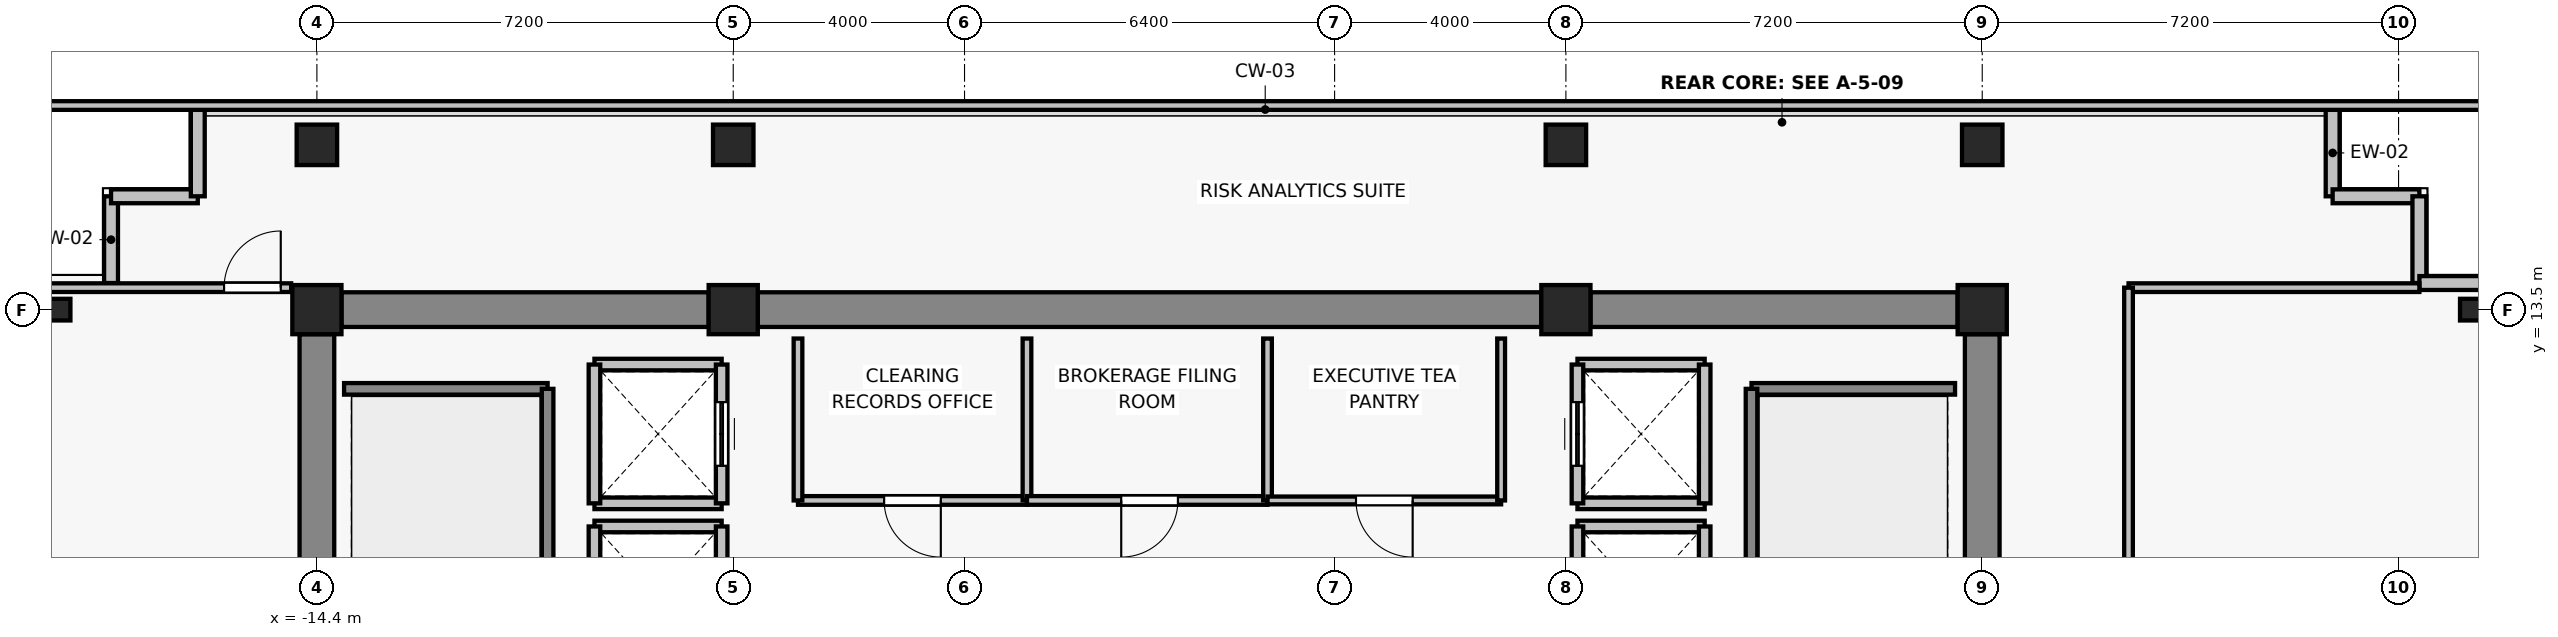
"""IFC4 building model, lengths in metres.
Left out: names, types, materials, properties, quantities, classifications, styles, units other than length and angle.
Written with IfcOpenShell. Run it as: python <this file> out.ifc"""

import sys

from ifc_helpers import new_model, si_unit, direction, frame, frame_2d, origin, origin_2d, place, context, subcontext, project, spatial, rectangle, i_section, extrude, source, transform, mapped, element, fill, save


model = new_model("IFC4")
c1 = context("Model", 3, precision=1e-05, world=origin(), true_north=direction((0.0, 1.0)))
c2 = subcontext(c1, "Body", "Model", "MODEL_VIEW")
j1 = project(units=[si_unit("LENGTHUNIT", "METRE"), si_unit("PLANEANGLEUNIT", "RADIAN")], contexts=[c1])
p1 = place(None, origin())
s1 = spatial("IfcSite", under=j1, at=p1, CompositionType="ELEMENT")
p2 = place(p1, origin())
s2 = spatial("IfcBuilding", under=s1, at=p2, CompositionType="ELEMENT")
p3 = place(p2, frame((0.0, 0.0, 245.2)))
s3 = spatial("IfcBuildingStorey", under=s2, at=p3, CompositionType="ELEMENT", Elevation=245.2)
for number, where, z_axis, x_axis in (
    (1, (-14.4, 13.5, 0.0), (0.0, 0.0, 1.0), (1.0, 0.0, 0.0)),
    (2, (-7.2, 13.5, 0.0), (0.0, 0.0, 1.0), (1.0, 0.0, 0.0)),
    (3, (7.2, 13.5, 0.0), (0.0, 0.0, 1.0), (1.0, 0.0, 0.0)),
    (4, (14.4, 13.5, 0.0), (0.0, 0.0, 1.0), (1.0, 0.0, 0.0)),
):
    element("IfcColumn", number, at=place(p3, frame(where, z_axis=z_axis, x_axis=x_axis)), inside=s3, PredefinedType="COLUMN", context=c2, shape_type="SweptSolid", body=[
        extrude(rectangle(XDim=0.85, YDim=0.85, at=origin_2d()), origin(), (0.0, 0.0, 1.0), 3.3),
    ])
for number, where, z_axis, x_axis in (
    (5, (-14.4, 16.35, 0.0), (0.0, 0.0, 1.0), (1.0, 0.0, 0.0)),
    (6, (-7.2, 16.35, 0.0), (0.0, 0.0, 1.0), (1.0, 0.0, 0.0)),
    (7, (7.2, 16.35, 0.0), (0.0, 0.0, 1.0), (1.0, 0.0, 0.0)),
    (8, (14.4, 16.35, 0.0), (0.0, 0.0, 1.0), (1.0, 0.0, 0.0)),
):
    element("IfcColumn", number, at=place(p3, frame(where, z_axis=z_axis, x_axis=x_axis)), inside=s3, PredefinedType="COLUMN", context=c2, shape_type="SweptSolid", body=[
        extrude(rectangle(XDim=0.7, YDim=0.7, at=origin_2d()), origin(), (0.0, 0.0, 1.0), 3.3),
    ])
for number, where, z_axis, x_axis in (
    (9, (-18.85, 13.5, 0.0), (0.0, 0.0, 1.0), (1.0, 0.0, 0.0)),
    (10, (22.85, 13.5, 0.0), (0.0, 0.0, 1.0), (1.0, 0.0, 0.0)),
):
    element("IfcColumn", number, at=place(p3, frame(where, z_axis=z_axis, x_axis=x_axis)), inside=s3, PredefinedType="COLUMN", context=c2, shape_type="SweptSolid", body=[
        extrude(i_section(OverallWidth=0.375, OverallDepth=0.375, WebThickness=0.017, FlangeThickness=0.027, FilletRadius=0.015, at=origin_2d()), origin(), (0.0, 0.0, 1.0), 3.3),
    ])
p4 = place(p3, frame((-13.975, 13.5, 0.0), z_axis=(0.0, 0.0, 1.0), x_axis=(1.0, 0.0, 0.0)))
e11 = element("IfcWall", 11, at=p4, inside=s3, PredefinedType="SHEAR", context=c2, shape_type="SweptSolid", body=[
    extrude(rectangle(XDim=6.35, YDim=0.6, at=frame_2d((3.175, 0.0))), origin(), (0.0, 0.0, 1.0), 3.075),
])
p5 = place(p3, frame((-6.775, 13.5, 0.0), z_axis=(0.0, 0.0, 1.0), x_axis=(1.0, 0.0, 0.0)))
e12 = element("IfcWall", 12, at=p5, inside=s3, PredefinedType="SHEAR", context=c2, shape_type="SweptSolid", body=[
    extrude(rectangle(XDim=13.55, YDim=0.6, at=frame_2d((6.775, 0.0))), origin(), (0.0, 0.0, 1.0), 3.075),
])
p6 = place(p3, frame((7.625, 13.5, 0.0), z_axis=(0.0, 0.0, 1.0), x_axis=(1.0, 0.0, 0.0)))
e13 = element("IfcWall", 13, at=p6, inside=s3, PredefinedType="SHEAR", context=c2, shape_type="SweptSolid", body=[
    extrude(rectangle(XDim=6.35, YDim=0.6, at=frame_2d((3.175, 0.0))), origin(), (0.0, 0.0, 1.0), 3.075),
])
for number, where, z_axis, x_axis in (
    (14, (-14.4, 7.025, 0.0), (0.0, 0.0, 1.0), (0.0, 1.0, 0.0)),
    (15, (14.4, 7.025, 0.0), (0.0, 0.0, 1.0), (0.0, 1.0, 0.0)),
):
    element("IfcWall", number, at=place(p3, frame(where, z_axis=z_axis, x_axis=x_axis)), inside=s3, PredefinedType="SHEAR", context=c2, shape_type="SweptSolid", body=[
        extrude(rectangle(XDim=6.05, YDim=0.6, at=frame_2d((3.025, 0.0))), origin(), (0.0, 0.0, 1.0), 3.075),
    ])
for number, where, z_axis, x_axis in (
    (16, (-17.96, 15.46, 0.0), (0.0, 0.0, 1.0), (0.0, -1.0, 0.0)),
    (17, (-16.46, 15.46, 0.0), (0.0, 0.0, 1.0), (-1.0, 0.0, 0.0)),
    (18, (-16.46, 16.96, 0.0), (0.0, 0.0, 1.0), (0.0, -1.0, 0.0)),
    (19, (20.46, 15.46, 0.0), (0.0, 0.0, 1.0), (0.0, 1.0, 0.0)),
    (20, (21.96, 15.46, 0.0), (0.0, 0.0, 1.0), (-1.0, 0.0, 0.0)),
    (21, (21.96, 13.96, 0.0), (0.0, 0.0, 1.0), (0.0, 1.0, 0.0)),
    (22, (23.46, 13.96, 0.0), (0.0, 0.0, 1.0), (-1.0, 0.0, 0.0)),
):
    element("IfcWall", number, at=place(p3, frame(where, z_axis=z_axis, x_axis=x_axis)), inside=s3, PredefinedType="SOLIDWALL", context=c2, shape_type="SweptSolid", body=[
        extrude(rectangle(XDim=1.5, YDim=0.24, at=frame_2d((0.75, 0.0))), origin(), (0.0, 0.0, 1.0), 3.075),
    ])
p7 = place(p3, frame((-9.6, 9.75, 0.0), z_axis=(0.0, 0.0, 1.0), x_axis=(1.0, 0.0, 0.0)))
e23 = element("IfcWall", 23, at=p7, inside=s3, PredefinedType="SOLIDWALL", context=c2, shape_type="SweptSolid", body=[
    extrude(rectangle(XDim=2.2, YDim=0.2, at=frame_2d((1.1, 0.0))), origin(), (0.0, 0.0, 1.0), 2.615),
])
p8 = place(p3, frame((-9.6, 7.35, 0.0), z_axis=(0.0, 0.0, 1.0), x_axis=(0.0, 1.0, 0.0)))
e24 = element("IfcWall", 24, at=p8, inside=s3, PredefinedType="SOLIDWALL", context=c2, shape_type="SweptSolid", body=[
    extrude(rectangle(XDim=2.4, YDim=0.2, at=frame_2d((1.2, 0.0))), origin(), (0.0, 0.0, 1.0), 3.075),
])
p9 = place(p3, frame((-7.4, 9.75, 0.0), z_axis=(0.0, 0.0, 1.0), x_axis=(0.0, -1.0, 0.0)))
e25 = element("IfcWall", 25, at=p9, inside=s3, PredefinedType="SOLIDWALL", context=c2, shape_type="SweptSolid", body=[
    extrude(rectangle(XDim=2.4, YDim=0.2, at=frame_2d((1.2, 0.0))), origin(), (0.0, 0.0, 1.0), 2.615),
])
p10 = place(p9, frame((0.65, 0.0, 0.0)))
e26 = element("IfcOpeningElement", 26, at=p10, cuts=e25, PredefinedType="OPENING", context=c2, shape_type="SweptSolid", body=[
    extrude(rectangle(XDim=1.1, YDim=2.2, at=frame_2d((0.55, 1.1))), frame((0.0, 0.11, 0.0), z_axis=(0.0, -1.0, 0.0), x_axis=(1.0, 0.0, 0.0)), (0.0, 0.0, 1.0), 0.22),
])
for number, where, z_axis, x_axis in (
    (27, (-7.4, 10.15, 0.0), (0.0, 0.0, 1.0), (-1.0, 0.0, 0.0)),
    (28, (-9.6, 12.55, 0.0), (0.0, 0.0, 1.0), (1.0, 0.0, 0.0)),
):
    element("IfcWall", number, at=place(p3, frame(where, z_axis=z_axis, x_axis=x_axis)), inside=s3, PredefinedType="SOLIDWALL", context=c2, shape_type="SweptSolid", body=[
        extrude(rectangle(XDim=2.2, YDim=0.2, at=frame_2d((1.1, 0.0))), origin(), (0.0, 0.0, 1.0), 2.615),
    ])
p11 = place(p3, frame((-9.6, 10.15, 0.0), z_axis=(0.0, 0.0, 1.0), x_axis=(0.0, 1.0, 0.0)))
e29 = element("IfcWall", 29, at=p11, inside=s3, PredefinedType="SOLIDWALL", context=c2, shape_type="SweptSolid", body=[
    extrude(rectangle(XDim=2.4, YDim=0.2, at=frame_2d((1.2, 0.0))), origin(), (0.0, 0.0, 1.0), 3.075),
])
p12 = place(p3, frame((-7.4, 12.55, 0.0), z_axis=(0.0, 0.0, 1.0), x_axis=(0.0, -1.0, 0.0)))
e30 = element("IfcWall", 30, at=p12, inside=s3, PredefinedType="SOLIDWALL", context=c2, shape_type="SweptSolid", body=[
    extrude(rectangle(XDim=2.4, YDim=0.2, at=frame_2d((1.2, 0.0))), origin(), (0.0, 0.0, 1.0), 2.615),
])
p13 = place(p12, frame((0.65, 0.0, 0.0)))
e31 = element("IfcOpeningElement", 31, at=p13, cuts=e30, PredefinedType="OPENING", context=c2, shape_type="SweptSolid", body=[
    extrude(rectangle(XDim=1.1, YDim=2.2, at=frame_2d((0.55, 1.1))), frame((0.0, 0.11, 0.0), z_axis=(0.0, -1.0, 0.0), x_axis=(1.0, 0.0, 0.0)), (0.0, 0.0, 1.0), 0.22),
])
p14 = place(p3, frame((7.4, 9.75, 0.0), z_axis=(0.0, 0.0, 1.0), x_axis=(1.0, 0.0, 0.0)))
e32 = element("IfcWall", 32, at=p14, inside=s3, PredefinedType="SOLIDWALL", context=c2, shape_type="SweptSolid", body=[
    extrude(rectangle(XDim=2.2, YDim=0.2, at=frame_2d((1.1, 0.0))), origin(), (0.0, 0.0, 1.0), 2.615),
])
p15 = place(p3, frame((7.4, 7.35, 0.0), z_axis=(0.0, 0.0, 1.0), x_axis=(0.0, 1.0, 0.0)))
e33 = element("IfcWall", 33, at=p15, inside=s3, PredefinedType="SOLIDWALL", context=c2, shape_type="SweptSolid", body=[
    extrude(rectangle(XDim=2.4, YDim=0.2, at=frame_2d((1.2, 0.0))), origin(), (0.0, 0.0, 1.0), 2.615),
])
p16 = place(p15, frame((0.65, 0.0, 0.0)))
e34 = element("IfcOpeningElement", 34, at=p16, cuts=e33, PredefinedType="OPENING", context=c2, shape_type="SweptSolid", body=[
    extrude(rectangle(XDim=1.1, YDim=2.2, at=frame_2d((0.55, 1.1))), frame((0.0, 0.11, 0.0), z_axis=(0.0, -1.0, 0.0), x_axis=(1.0, 0.0, 0.0)), (0.0, 0.0, 1.0), 0.22),
])
p17 = place(p3, frame((9.6, 9.75, 0.0), z_axis=(0.0, 0.0, 1.0), x_axis=(0.0, -1.0, 0.0)))
e35 = element("IfcWall", 35, at=p17, inside=s3, PredefinedType="SOLIDWALL", context=c2, shape_type="SweptSolid", body=[
    extrude(rectangle(XDim=2.4, YDim=0.2, at=frame_2d((1.2, 0.0))), origin(), (0.0, 0.0, 1.0), 3.075),
])
for number, where, z_axis, x_axis in (
    (36, (9.6, 10.15, 0.0), (0.0, 0.0, 1.0), (-1.0, 0.0, 0.0)),
    (37, (7.4, 12.55, 0.0), (0.0, 0.0, 1.0), (1.0, 0.0, 0.0)),
):
    element("IfcWall", number, at=place(p3, frame(where, z_axis=z_axis, x_axis=x_axis)), inside=s3, PredefinedType="SOLIDWALL", context=c2, shape_type="SweptSolid", body=[
        extrude(rectangle(XDim=2.2, YDim=0.2, at=frame_2d((1.1, 0.0))), origin(), (0.0, 0.0, 1.0), 2.615),
    ])
p18 = place(p3, frame((7.4, 10.15, 0.0), z_axis=(0.0, 0.0, 1.0), x_axis=(0.0, 1.0, 0.0)))
e38 = element("IfcWall", 38, at=p18, inside=s3, PredefinedType="SOLIDWALL", context=c2, shape_type="SweptSolid", body=[
    extrude(rectangle(XDim=2.4, YDim=0.2, at=frame_2d((1.2, 0.0))), origin(), (0.0, 0.0, 1.0), 2.615),
])
p19 = place(p18, frame((0.65, 0.0, 0.0)))
e39 = element("IfcOpeningElement", 39, at=p19, cuts=e38, PredefinedType="OPENING", context=c2, shape_type="SweptSolid", body=[
    extrude(rectangle(XDim=1.1, YDim=2.2, at=frame_2d((0.55, 1.1))), frame((0.0, 0.11, 0.0), z_axis=(0.0, -1.0, 0.0), x_axis=(1.0, 0.0, 0.0)), (0.0, 0.0, 1.0), 0.22),
])
p20 = place(p3, frame((9.6, 12.55, 0.0), z_axis=(0.0, 0.0, 1.0), x_axis=(0.0, -1.0, 0.0)))
e40 = element("IfcWall", 40, at=p20, inside=s3, PredefinedType="SOLIDWALL", context=c2, shape_type="SweptSolid", body=[
    extrude(rectangle(XDim=2.4, YDim=0.2, at=frame_2d((1.2, 0.0))), origin(), (0.0, 0.0, 1.0), 3.075),
])
p21 = place(p3, frame((-13.93, 12.13, 0.0), z_axis=(0.0, 0.0, 1.0), x_axis=(1.0, 0.0, 0.0)))
e41 = element("IfcWall", 41, at=p21, inside=s3, PredefinedType="SOLIDWALL", context=c2, shape_type="SweptSolid", body=[
    extrude(rectangle(XDim=3.52, YDim=0.2, at=frame_2d((1.76, 0.0))), origin(), (0.0, 0.0, 1.0), 3.075),
])
p22 = place(p3, frame((-10.41, 12.13, 0.0), z_axis=(0.0, 0.0, 1.0), x_axis=(0.0, -1.0, 0.0)))
e42 = element("IfcWall", 42, at=p22, inside=s3, PredefinedType="SOLIDWALL", context=c2, shape_type="SweptSolid", body=[
    extrude(rectangle(XDim=8.84, YDim=0.2, at=frame_2d((4.42, 0.0))), origin(), (0.0, 0.0, 1.0), 3.075),
])
p23 = place(p3, frame((10.41, 12.13, 0.0), z_axis=(0.0, 0.0, 1.0), x_axis=(1.0, 0.0, 0.0)))
e43 = element("IfcWall", 43, at=p23, inside=s3, PredefinedType="SOLIDWALL", context=c2, shape_type="SweptSolid", body=[
    extrude(rectangle(XDim=3.52, YDim=0.2, at=frame_2d((1.76, 0.0))), origin(), (0.0, 0.0, 1.0), 3.075),
])
p24 = place(p3, frame((10.41, 3.29, 0.0), z_axis=(0.0, 0.0, 1.0), x_axis=(0.0, 1.0, 0.0)))
e44 = element("IfcWall", 44, at=p24, inside=s3, PredefinedType="SOLIDWALL", context=c2, shape_type="SweptSolid", body=[
    extrude(rectangle(XDim=8.84, YDim=0.2, at=frame_2d((4.42, 0.0))), origin(), (0.0, 0.0, 1.0), 3.075),
])
p25 = place(p3, frame((-2.12, 10.2, 0.0), z_axis=(0.0, 0.0, 1.0), x_axis=(-1.0, 0.0, 0.0)))
e45 = element("IfcWall", 45, at=p25, inside=s3, PredefinedType="PARTITIONING", context=c2, shape_type="SweptSolid", body=[
    extrude(rectangle(XDim=3.96, YDim=0.15, at=frame_2d((1.98, 0.0))), origin(), (0.0, 0.0, 1.0), 3.075),
])
p26 = place(p25, frame((1.49, 0.0, 0.0)))
e46 = element("IfcOpeningElement", 46, at=p26, cuts=e45, PredefinedType="OPENING", context=c2, shape_type="SweptSolid", body=[
    extrude(rectangle(XDim=0.98, YDim=2.15, at=frame_2d((0.49, 1.075))), frame((0.0, 0.085, 0.0), z_axis=(0.0, -1.0, 0.0), x_axis=(1.0, 0.0, 0.0)), (0.0, 0.0, 1.0), 0.17),
])
for number, where, z_axis, x_axis in (
    (47, (-6.08, 10.2, 0.0), (0.0, 0.0, 1.0), (0.0, 1.0, 0.0)),
    (48, (-2.12, 13.0, 0.0), (0.0, 0.0, 1.0), (0.0, -1.0, 0.0)),
):
    element("IfcWall", number, at=place(p3, frame(where, z_axis=z_axis, x_axis=x_axis)), inside=s3, PredefinedType="PARTITIONING", context=c2, shape_type="SweptSolid", body=[
        extrude(rectangle(XDim=2.8, YDim=0.15, at=frame_2d((1.4, 0.0))), origin(), (0.0, 0.0, 1.0), 3.075),
    ])
p27 = place(p3, frame((2.04, 10.2, 0.0), z_axis=(0.0, 0.0, 1.0), x_axis=(-1.0, 0.0, 0.0)))
e49 = element("IfcWall", 49, at=p27, inside=s3, PredefinedType="PARTITIONING", context=c2, shape_type="SweptSolid", body=[
    extrude(rectangle(XDim=4.16, YDim=0.15, at=frame_2d((2.08, 0.0))), origin(), (0.0, 0.0, 1.0), 3.075),
])
p28 = place(p27, frame((1.55, 0.0, 0.0)))
e50 = element("IfcOpeningElement", 50, at=p28, cuts=e49, PredefinedType="OPENING", context=c2, shape_type="SweptSolid", body=[
    extrude(rectangle(XDim=0.98, YDim=2.15, at=frame_2d((0.49, 1.075))), frame((0.0, 0.085, 0.0), z_axis=(0.0, -1.0, 0.0), x_axis=(1.0, 0.0, 0.0)), (0.0, 0.0, 1.0), 0.17),
])
p29 = place(p3, frame((2.04, 13.0, 0.0), z_axis=(0.0, 0.0, 1.0), x_axis=(0.0, -1.0, 0.0)))
e51 = element("IfcWall", 51, at=p29, inside=s3, PredefinedType="PARTITIONING", context=c2, shape_type="SweptSolid", body=[
    extrude(rectangle(XDim=2.8, YDim=0.15, at=frame_2d((1.4, 0.0))), origin(), (0.0, 0.0, 1.0), 3.075),
])
p30 = place(p3, frame((6.08, 10.2, 0.0), z_axis=(0.0, 0.0, 1.0), x_axis=(-1.0, 0.0, 0.0)))
e52 = element("IfcWall", 52, at=p30, inside=s3, PredefinedType="PARTITIONING", context=c2, shape_type="SweptSolid", body=[
    extrude(rectangle(XDim=4.04, YDim=0.135, at=frame_2d((2.02, 0.0))), origin(), (0.0, 0.0, 1.0), 3.075),
])
p31 = place(p30, frame((1.53, 0.0, 0.0)))
e53 = element("IfcOpeningElement", 53, at=p31, cuts=e52, PredefinedType="OPENING", context=c2, shape_type="SweptSolid", body=[
    extrude(rectangle(XDim=0.98, YDim=2.15, at=frame_2d((0.49, 1.075))), frame((0.0, 0.077, 0.0), z_axis=(0.0, -1.0, 0.0), x_axis=(1.0, 0.0, 0.0)), (0.0, 0.0, 1.0), 0.155),
])
p32 = place(p3, frame((6.08, 13.0, 0.0), z_axis=(0.0, 0.0, 1.0), x_axis=(0.0, -1.0, 0.0)))
e54 = element("IfcWall", 54, at=p32, inside=s3, PredefinedType="PARTITIONING", context=c2, shape_type="SweptSolid", body=[
    extrude(rectangle(XDim=2.8, YDim=0.135, at=frame_2d((1.4, 0.0))), origin(), (0.0, 0.0, 1.0), 3.075),
])
p33 = place(p3, frame((-19.53, 13.88, 0.0), z_axis=(0.0, 0.0, 1.0), x_axis=(1.0, 0.0, 0.0)))
e55 = element("IfcWall", 55, at=p33, inside=s3, PredefinedType="PARTITIONING", context=c2, shape_type="SweptSolid", body=[
    extrude(rectangle(XDim=4.685, YDim=0.15, at=frame_2d((2.343, 0.0))), origin(), (0.0, 0.0, 1.0), 3.075),
])
p34 = place(p33, frame((3.525, 0.0, 0.0)))
e56 = element("IfcOpeningElement", 56, at=p34, cuts=e55, PredefinedType="OPENING", context=c2, shape_type="SweptSolid", body=[
    extrude(rectangle(XDim=0.98, YDim=2.15, at=frame_2d((0.49, 1.075))), frame((0.0, 0.085, 0.0), z_axis=(0.0, -1.0, 0.0), x_axis=(1.0, 0.0, 0.0)), (0.0, 0.0, 1.0), 0.17),
])
p35 = place(p3, frame((16.93, 13.88, 0.0), z_axis=(0.0, 0.0, 1.0), x_axis=(1.0, 0.0, 0.0)))
e57 = element("IfcWall", 57, at=p35, inside=s3, PredefinedType="PARTITIONING", context=c2, shape_type="SweptSolid", body=[
    extrude(rectangle(XDim=5.03, YDim=0.15, at=frame_2d((2.515, 0.0))), origin(), (0.0, 0.0, 1.0), 3.075),
])
p36 = place(p3, frame((16.93, -1.77, 0.0), z_axis=(0.0, 0.0, 1.0), x_axis=(0.0, 1.0, 0.0)))
e58 = element("IfcWall", 58, at=p36, inside=s3, PredefinedType="PARTITIONING", context=c2, shape_type="SweptSolid", body=[
    extrude(rectangle(XDim=15.65, YDim=0.15, at=frame_2d((7.825, 0.0))), origin(), (0.0, 0.0, 1.0), 2.615),
])
p37 = place(p36, frame((7.335, 0.0, 0.0)))
e59 = element("IfcOpeningElement", 59, at=p37, cuts=e58, PredefinedType="OPENING", context=c2, shape_type="SweptSolid", body=[
    extrude(rectangle(XDim=0.98, YDim=2.15, at=frame_2d((0.49, 1.075))), frame((0.0, 0.085, 0.0), z_axis=(0.0, -1.0, 0.0), x_axis=(1.0, 0.0, 0.0)), (0.0, 0.0, 1.0), 0.17),
])
p38 = place(p3, frame((-19.53, 17.03, 0.0), z_axis=(0.0, 0.0, 1.0), x_axis=(1.0, 0.0, 0.0)))
e60 = element("IfcWall", 60, at=p38, inside=s3, PredefinedType="PARTITIONING", context=c2, shape_type="SweptSolid", body=[
    extrude(rectangle(XDim=43.06, YDim=0.15, at=frame_2d((21.53, 0.0))), origin(), (0.0, 0.0, 1.0), 3.075),
])
m1 = source(origin(), c2, "Body", "SweptSolid", [
    extrude(rectangle(XDim=1.1, YDim=2.2, at=frame_2d((0.55, 1.1))), frame((0.0, 0.025, 0.0), z_axis=(0.0, -1.0, 0.0), x_axis=(1.0, 0.0, 0.0)), (0.0, 0.0, 1.0), 0.05),
])
p39 = place(p13, origin())
e61 = element("IfcDoor", 61, at=p39, inside=s3, OperationType="DOUBLE_DOOR_SLIDING", PredefinedType="DOOR", context=c2, shape_type="MappedRepresentation", body=[
    mapped(m1, transform((0.0, 0.0, 0.0), x_axis=(1.0, 0.0, 0.0), y_axis=(0.0, 1.0, 0.0), z_axis=(0.0, 0.0, 1.0), scale=1.0)),
])
fill(e31, e61)
p40 = place(p19, origin())
e62 = element("IfcDoor", 62, at=p40, inside=s3, OperationType="DOUBLE_DOOR_SLIDING", PredefinedType="DOOR", context=c2, shape_type="MappedRepresentation", body=[
    mapped(m1, transform((0.0, 0.0, 0.0), x_axis=(1.0, 0.0, 0.0), y_axis=(0.0, 1.0, 0.0), z_axis=(0.0, 0.0, 1.0), scale=1.0)),
])
fill(e39, e62)
m2 = source(origin(), c2, "Body", "SweptSolid", [
    extrude(rectangle(XDim=0.98, YDim=2.15, at=frame_2d((0.49, 1.075))), frame((0.0, 0.025, 0.0), z_axis=(0.0, -1.0, 0.0), x_axis=(1.0, 0.0, 0.0)), (0.0, 0.0, 1.0), 0.05),
])
p41 = place(p26, origin())
e63 = element("IfcDoor", 63, at=p41, inside=s3, OperationType="SINGLE_SWING_LEFT", PredefinedType="DOOR", context=c2, shape_type="MappedRepresentation", body=[
    mapped(m2, transform((0.0, 0.0, 0.0), x_axis=(1.0, 0.0, 0.0), y_axis=(0.0, 1.0, 0.0), z_axis=(0.0, 0.0, 1.0), scale=1.0)),
])
fill(e46, e63)
p42 = place(p28, origin())
e64 = element("IfcDoor", 64, at=p42, inside=s3, OperationType="SINGLE_SWING_RIGHT", PredefinedType="DOOR", context=c2, shape_type="MappedRepresentation", body=[
    mapped(m2, transform((0.0, 0.0, 0.0), x_axis=(1.0, 0.0, 0.0), y_axis=(0.0, 1.0, 0.0), z_axis=(0.0, 0.0, 1.0), scale=1.0)),
])
fill(e50, e64)
p43 = place(p31, origin())
e65 = element("IfcDoor", 65, at=p43, inside=s3, OperationType="SINGLE_SWING_LEFT", PredefinedType="DOOR", context=c2, shape_type="MappedRepresentation", body=[
    mapped(m2, transform((0.0, 0.0, 0.0), x_axis=(1.0, 0.0, 0.0), y_axis=(0.0, 1.0, 0.0), z_axis=(0.0, 0.0, 1.0), scale=1.0)),
])
fill(e53, e65)
p44 = place(p34, origin())
e66 = element("IfcDoor", 66, at=p44, inside=s3, OperationType="SINGLE_SWING_RIGHT", PredefinedType="DOOR", context=c2, shape_type="MappedRepresentation", body=[
    mapped(m2, transform((0.0, 0.0, 0.0), x_axis=(1.0, 0.0, 0.0), y_axis=(0.0, 1.0, 0.0), z_axis=(0.0, 0.0, 1.0), scale=1.0)),
])
fill(e56, e66)
save(model, sys.argv[1])
